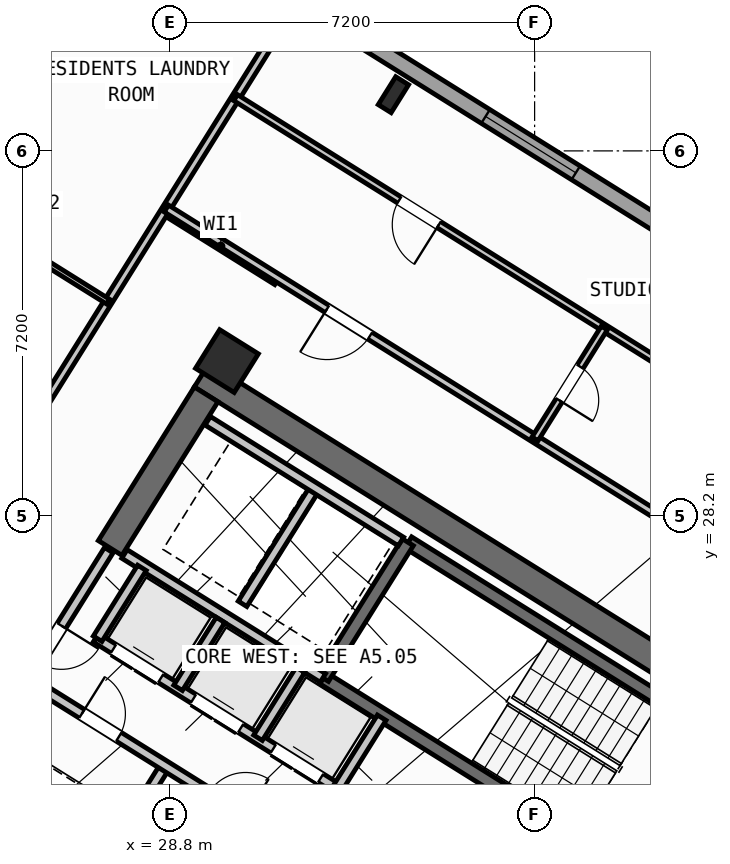
"""IFC4 building model, lengths in metres.
Left out: names, types, materials, properties, quantities, classifications, styles, units other than length and angle.
Written with IfcOpenShell. Run it as: python <this file> out.ifc"""

import sys

from ifc_helpers import new_model, si_unit, direction, frame, frame_2d, origin, origin_2d, place, context, subcontext, project, spatial, rectangle, hollow_rectangle, i_section, extrude, source, transform, mapped, element, fill, save


model = new_model("IFC4")
c1 = context("Model", 3, precision=1e-05, world=origin(), true_north=direction((0.0, 1.0)))
c2 = subcontext(c1, "Body", "Model", "MODEL_VIEW")
j1 = project(units=[si_unit("LENGTHUNIT", "METRE"), si_unit("PLANEANGLEUNIT", "RADIAN")], contexts=[c1])
p1 = place(None, origin())
s1 = spatial("IfcSite", under=j1, at=p1, CompositionType="ELEMENT")
p2 = place(p1, origin())
s2 = spatial("IfcBuilding", under=s1, at=p2, CompositionType="ELEMENT")
p3 = place(p2, frame((0.0, 0.0, 105.3)))
s3 = spatial("IfcBuildingStorey", under=s2, at=p3, CompositionType="ELEMENT", Elevation=105.3)
p4 = place(p3, frame((40.573, 24.01, 0.0), z_axis=(0.0, 0.0, 1.0), x_axis=(-0.848047359947, 0.529920442413, 0.0)))
e1 = element("IfcWall", 1, at=p4, inside=s3, PredefinedType="SHEAR", context=c2, shape_type="SweptSolid", body=[
    extrude(rectangle(XDim=13.14, YDim=0.55, at=frame_2d((6.57, 0.0))), origin(), (0.0, 0.0, 1.0), 3.35),
])
p5 = place(p3, frame((40.194, 23.922, 0.0), z_axis=(0.0, 0.0, 1.0), x_axis=(-0.529888438328, -0.848067357541, 0.0)))
e2 = element("IfcWall", 2, at=p5, inside=s3, PredefinedType="SHEAR", context=c2, shape_type="SweptSolid", body=[
    extrude(rectangle(XDim=3.575, YDim=0.55, at=frame_2d((1.788, 0.0))), origin(), (0.0, 0.0, 1.0), 3.35),
])
p6 = place(p3, frame((29.517, 30.594, 0.0), z_axis=(0.0, 0.0, 1.0), x_axis=(-0.529906864564, -0.848055844204, 0.0)))
e3 = element("IfcWall", 3, at=p6, inside=s3, PredefinedType="SHEAR", context=c2, shape_type="SweptSolid", body=[
    extrude(rectangle(XDim=3.575, YDim=0.55, at=frame_2d((1.788, 0.0))), origin(), (0.0, 0.0, 1.0), 3.35),
])
m1 = source(origin(), c2, "Body", "SweptSolid", [
    extrude(i_section(OverallWidth=0.3, OverallDepth=0.65, WebThickness=0.016, FlangeThickness=0.031, at=origin_2d()), origin(), (0.0, 0.0, 1.0), 3.6),
])
p7 = place(p3, frame((33.213, 36.509, 0.0), z_axis=(0.0, 0.0, 1.0), x_axis=(-0.848048096156, 0.529919264233, 0.0)))
e4 = element("IfcColumn", 4, at=p7, inside=s3, PredefinedType="COLUMN", context=c2, shape_type="MappedRepresentation", body=[
    mapped(m1, transform((0.0, 0.0, 0.0), scale=1.0)),
])
m2 = source(origin(), c2, "Body", "SweptSolid", [
    extrude(hollow_rectangle(XDim=0.9, YDim=0.9, WallThickness=0.036, at=origin_2d()), origin(), (0.0, 0.0, 1.0), 3.6),
])
p8 = place(p3, frame((29.928, 31.251, 0.0), z_axis=(0.0, 0.0, 1.0), x_axis=(-0.848048096156, 0.529919264233, 0.0)))
e5 = element("IfcColumn", 5, at=p8, inside=s3, PredefinedType="COLUMN", context=c2, shape_type="MappedRepresentation", body=[
    mapped(m2, transform((0.0, 0.0, 0.0), scale=1.0)),
])
p9 = place(p3, frame((31.76, 12.183, 0.0), z_axis=(0.0, 0.0, 1.0), x_axis=(-0.848047074256, 0.529920899612, 0.0)))
e6 = element("IfcWall", 6, at=p9, inside=s3, PredefinedType="STANDARD", context=c2, shape_type="SweptSolid", body=[
    extrude(rectangle(XDim=30.652, YDim=0.32, at=frame_2d((15.326, 0.0))), origin(), (0.0, 0.0, 1.0), 3.35),
])
p10 = place(p9, frame((15.153, 0.0, 0.0)))
e7 = element("IfcOpeningElement", 7, at=p10, cuts=e6, PredefinedType="OPENING", context=c2, shape_type="SweptSolid", body=[
    extrude(rectangle(XDim=1.2, YDim=2.15, at=frame_2d((0.6, 1.075))), frame((0.0, 0.17, 0.0), z_axis=(0.0, -1.0, 0.0), x_axis=(1.0, 0.0, 0.0)), (0.0, 0.0, 1.0), 0.34),
])
p11 = place(p9, frame((2.002, 0.0, 0.8)))
e8 = element("IfcOpeningElement", 8, at=p11, cuts=e6, PredefinedType="OPENING", context=c2, shape_type="SweptSolid", body=[
    extrude(rectangle(XDim=2.1, YDim=1.55, at=frame_2d((1.05, 0.775))), frame((0.0, 0.17, 0.0), z_axis=(0.0, -1.0, 0.0), x_axis=(1.0, 0.0, 0.0)), (0.0, 0.0, 1.0), 0.34),
])
p12 = place(p9, frame((7.206, 0.0, 0.8)))
e9 = element("IfcOpeningElement", 9, at=p12, cuts=e6, PredefinedType="OPENING", context=c2, shape_type="SweptSolid", body=[
    extrude(rectangle(XDim=2.1, YDim=1.55, at=frame_2d((1.05, 0.775))), frame((0.0, 0.17, 0.0), z_axis=(0.0, -1.0, 0.0), x_axis=(1.0, 0.0, 0.0)), (0.0, 0.0, 1.0), 0.34),
])
p13 = place(p9, frame((12.648, 0.0, 1.0)))
e10 = element("IfcOpeningElement", 10, at=p13, cuts=e6, PredefinedType="OPENING", context=c2, shape_type="SweptSolid", body=[
    extrude(rectangle(XDim=0.9, YDim=1.25, at=frame_2d((0.45, 0.625))), frame((0.0, 0.17, 0.0), z_axis=(0.0, -1.0, 0.0), x_axis=(1.0, 0.0, 0.0)), (0.0, 0.0, 1.0), 0.34),
])
p14 = place(p9, frame((20.628, 0.0, 0.95)))
e11 = element("IfcOpeningElement", 11, at=p14, cuts=e6, PredefinedType="OPENING", context=c2, shape_type="SweptSolid", body=[
    extrude(rectangle(XDim=1.2, YDim=1.4, at=frame_2d((0.6, 0.7))), frame((0.0, 0.17, 0.0), z_axis=(0.0, -1.0, 0.0), x_axis=(1.0, 0.0, 0.0)), (0.0, 0.0, 1.0), 0.34),
])
p15 = place(p9, frame((26.008, 0.0, 1.0)))
e12 = element("IfcOpeningElement", 12, at=p15, cuts=e6, PredefinedType="OPENING", context=c2, shape_type="SweptSolid", body=[
    extrude(rectangle(XDim=0.9, YDim=1.25, at=frame_2d((0.45, 0.625))), frame((0.0, 0.17, 0.0), z_axis=(0.0, -1.0, 0.0), x_axis=(1.0, 0.0, 0.0)), (0.0, 0.0, 1.0), 0.34),
])
p16 = place(p9, frame((28.408, 0.0, 1.0)))
e13 = element("IfcOpeningElement", 13, at=p16, cuts=e6, PredefinedType="OPENING", context=c2, shape_type="SweptSolid", body=[
    extrude(rectangle(XDim=0.9, YDim=1.25, at=frame_2d((0.45, 0.625))), frame((0.0, 0.17, 0.0), z_axis=(0.0, -1.0, 0.0), x_axis=(1.0, 0.0, 0.0)), (0.0, 0.0, 1.0), 0.34),
])
p17 = place(p3, frame((17.424, 47.083, 0.0), z_axis=(0.0, 0.0, 1.0), x_axis=(0.848049927979, -0.529916332693, 0.0)))
e14 = element("IfcWall", 14, at=p17, inside=s3, PredefinedType="STANDARD", context=c2, shape_type="SweptSolid", body=[
    extrude(rectangle(XDim=29.223, YDim=0.32, at=frame_2d((14.612, 0.0))), origin(), (0.0, 0.0, 1.0), 3.35),
])
p18 = place(p17, frame((3.709, 0.0, 0.0)))
e15 = element("IfcOpeningElement", 15, at=p18, cuts=e14, PredefinedType="OPENING", context=c2, shape_type="SweptSolid", body=[
    extrude(rectangle(XDim=1.05, YDim=2.15, at=frame_2d((0.525, 1.075))), frame((0.0, 0.17, 0.0), z_axis=(0.0, -1.0, 0.0), x_axis=(1.0, 0.0, 0.0)), (0.0, 0.0, 1.0), 0.34),
])
p19 = place(p17, frame((0.659, 0.0, 0.95)))
e16 = element("IfcOpeningElement", 16, at=p19, cuts=e14, PredefinedType="OPENING", context=c2, shape_type="SweptSolid", body=[
    extrude(rectangle(XDim=1.2, YDim=1.4, at=frame_2d((0.6, 0.7))), frame((0.0, 0.17, 0.0), z_axis=(0.0, -1.0, 0.0), x_axis=(1.0, 0.0, 0.0)), (0.0, 0.0, 1.0), 0.34),
])
p20 = place(p17, frame((6.972, 0.0, 1.0)))
e17 = element("IfcOpeningElement", 17, at=p20, cuts=e14, PredefinedType="OPENING", context=c2, shape_type="SweptSolid", body=[
    extrude(rectangle(XDim=0.9, YDim=1.25, at=frame_2d((0.45, 0.625))), frame((0.0, 0.17, 0.0), z_axis=(0.0, -1.0, 0.0), x_axis=(1.0, 0.0, 0.0)), (0.0, 0.0, 1.0), 0.34),
])
p21 = place(p17, frame((9.847, 0.0, 0.85)))
e18 = element("IfcOpeningElement", 18, at=p21, cuts=e14, PredefinedType="OPENING", context=c2, shape_type="SweptSolid", body=[
    extrude(rectangle(XDim=1.5, YDim=1.5, at=frame_2d((0.75, 0.75))), frame((0.0, 0.17, 0.0), z_axis=(0.0, -1.0, 0.0), x_axis=(1.0, 0.0, 0.0)), (0.0, 0.0, 1.0), 0.34),
])
p22 = place(p17, frame((13.889, 0.0, 0.95)))
e19 = element("IfcOpeningElement", 19, at=p22, cuts=e14, PredefinedType="OPENING", context=c2, shape_type="SweptSolid", body=[
    extrude(rectangle(XDim=1.2, YDim=1.4, at=frame_2d((0.6, 0.7))), frame((0.0, 0.17, 0.0), z_axis=(0.0, -1.0, 0.0), x_axis=(1.0, 0.0, 0.0)), (0.0, 0.0, 1.0), 0.34),
])
p23 = place(p17, frame((17.254, 0.0, 1.0)))
e20 = element("IfcOpeningElement", 20, at=p23, cuts=e14, PredefinedType="OPENING", context=c2, shape_type="SweptSolid", body=[
    extrude(rectangle(XDim=0.9, YDim=1.25, at=frame_2d((0.45, 0.625))), frame((0.0, 0.17, 0.0), z_axis=(0.0, -1.0, 0.0), x_axis=(1.0, 0.0, 0.0)), (0.0, 0.0, 1.0), 0.34),
])
p24 = place(p17, frame((20.764, 0.0, 0.8)))
e21 = element("IfcOpeningElement", 21, at=p24, cuts=e14, PredefinedType="OPENING", context=c2, shape_type="SweptSolid", body=[
    extrude(rectangle(XDim=2.1, YDim=1.55, at=frame_2d((1.05, 0.775))), frame((0.0, 0.17, 0.0), z_axis=(0.0, -1.0, 0.0), x_axis=(1.0, 0.0, 0.0)), (0.0, 0.0, 1.0), 0.34),
])
p25 = place(p17, frame((25.403, 0.0, 0.8)))
e22 = element("IfcOpeningElement", 22, at=p25, cuts=e14, PredefinedType="OPENING", context=c2, shape_type="SweptSolid", body=[
    extrude(rectangle(XDim=2.1, YDim=1.55, at=frame_2d((1.05, 0.775))), frame((0.0, 0.17, 0.0), z_axis=(0.0, -1.0, 0.0), x_axis=(1.0, 0.0, 0.0)), (0.0, 0.0, 1.0), 0.34),
])
p26 = place(p3, frame((39.721, 23.788, 0.0), z_axis=(0.0, 0.0, 1.0), x_axis=(-0.848054434086, 0.529909121291, 0.0)))
e23 = element("IfcWall", 23, at=p26, inside=s3, PredefinedType="SHEAR", context=c2, shape_type="SweptSolid", body=[
    extrude(rectangle(XDim=7.33, YDim=0.26, at=frame_2d((3.665, 0.0))), origin(), (0.0, 0.0, 1.0), 3.35),
])
p27 = place(p3, frame((38.046, 21.108, 0.0), z_axis=(0.0, 0.0, 1.0), x_axis=(-0.848054434086, 0.529909121291, 0.0)))
e24 = element("IfcWall", 24, at=p27, inside=s3, PredefinedType="SHEAR", context=c2, shape_type="SweptSolid", body=[
    extrude(rectangle(XDim=7.33, YDim=0.26, at=frame_2d((3.665, 0.0))), origin(), (0.0, 0.0, 1.0), 3.35),
])
p28 = place(p27, frame((0.22, 0.0, 0.0)))
e25 = element("IfcOpeningElement", 25, at=p28, cuts=e24, PredefinedType="OPENING", context=c2, shape_type="SweptSolid", body=[
    extrude(rectangle(XDim=1.1, YDim=2.1, at=frame_2d((0.55, 1.05))), frame((0.0, 0.14, 0.0), z_axis=(0.0, -1.0, 0.0), x_axis=(1.0, 0.0, 0.0)), (0.0, 0.0, 1.0), 0.28),
])
p29 = place(p3, frame((33.496, 27.677, 0.0), z_axis=(0.0, 0.0, 1.0), x_axis=(-0.529908658664, -0.84805472316, 0.0)))
e26 = element("IfcWall", 26, at=p29, inside=s3, PredefinedType="SHEAR", context=c2, shape_type="SweptSolid", body=[
    extrude(rectangle(XDim=3.16, YDim=0.26, at=frame_2d((1.58, 0.0))), origin(), (0.0, 0.0, 1.0), 3.35),
])
p30 = place(p3, frame((31.822, 24.998, 0.0), z_axis=(0.0, 0.0, 1.0), x_axis=(-0.848036912365, 0.52993716162, 0.0)))
e27 = element("IfcWall", 27, at=p30, inside=s3, PredefinedType="STANDARD", context=c2, shape_type="SweptSolid", body=[
    extrude(rectangle(XDim=4.618, YDim=0.2, at=frame_2d((2.309, 0.0))), origin(), (0.0, 0.0, 1.0), 3.34),
])
p31 = place(p3, frame((32.108, 22.814, 0.0), z_axis=(0.0, 0.0, 1.0), x_axis=(-0.848042229521, 0.529928652696, 0.0)))
e28 = element("IfcWall", 28, at=p31, inside=s3, PredefinedType="STANDARD", context=c2, shape_type="SweptSolid", body=[
    extrude(rectangle(XDim=5.62, YDim=0.2, at=frame_2d((2.81, 0.0))), origin(), (0.0, 0.0, 1.0), 3.34),
])
p32 = place(p31, frame((0.39, 0.0, 0.0)))
e29 = element("IfcOpeningElement", 29, at=p32, cuts=e28, PredefinedType="OPENING", context=c2, shape_type="SweptSolid", body=[
    extrude(rectangle(XDim=1.1, YDim=2.15, at=frame_2d((0.55, 1.075))), frame((0.0, 0.11, 0.0), z_axis=(0.0, -1.0, 0.0), x_axis=(1.0, 0.0, 0.0)), (0.0, 0.0, 1.0), 0.22),
])
p33 = place(p31, frame((2.25, 0.0, 0.0)))
e30 = element("IfcOpeningElement", 30, at=p33, cuts=e28, PredefinedType="OPENING", context=c2, shape_type="SweptSolid", body=[
    extrude(rectangle(XDim=1.1, YDim=2.15, at=frame_2d((0.55, 1.075))), frame((0.0, 0.11, 0.0), z_axis=(0.0, -1.0, 0.0), x_axis=(1.0, 0.0, 0.0)), (0.0, 0.0, 1.0), 0.22),
])
p34 = place(p31, frame((4.11, 0.0, 0.0)))
e31 = element("IfcOpeningElement", 31, at=p34, cuts=e28, PredefinedType="OPENING", context=c2, shape_type="SweptSolid", body=[
    extrude(rectangle(XDim=1.1, YDim=2.15, at=frame_2d((0.55, 1.075))), frame((0.0, 0.11, 0.0), z_axis=(0.0, -1.0, 0.0), x_axis=(1.0, 0.0, 0.0)), (0.0, 0.0, 1.0), 0.22),
])
p35 = place(p3, frame((32.982, 24.213, 0.0), z_axis=(0.0, 0.0, 1.0), x_axis=(-0.529839334948, -0.84809803628, 0.0)))
e32 = element("IfcWall", 32, at=p35, inside=s3, PredefinedType="STANDARD", context=c2, shape_type="SweptSolid", body=[
    extrude(rectangle(XDim=1.65, YDim=0.2, at=frame_2d((0.825, 0.0))), origin(), (0.0, 0.0, 1.0), 3.34),
])
p36 = place(p3, frame((28.25, 27.17, 0.0), z_axis=(0.0, 0.0, 1.0), x_axis=(-0.529905827651, -0.848056492117, 0.0)))
e33 = element("IfcWall", 33, at=p36, inside=s3, PredefinedType="STANDARD", context=c2, shape_type="SweptSolid", body=[
    extrude(rectangle(XDim=1.65, YDim=0.2, at=frame_2d((0.825, 0.0))), origin(), (0.0, 0.0, 1.0), 3.34),
])
p37 = place(p3, frame((31.645, 28.716, 0.0), z_axis=(0.0, 0.0, 1.0), x_axis=(-0.52986693015, -0.848080795876, 0.0)))
e34 = element("IfcWall", 34, at=p37, inside=s3, PredefinedType="STANDARD", context=c2, shape_type="SweptSolid", body=[
    extrude(rectangle(XDim=2.66, YDim=0.2, at=frame_2d((1.33, 0.0))), origin(), (0.0, 0.0, 1.0), 3.34),
])
p38 = place(p3, frame((33.363, 27.69, 0.0), z_axis=(0.0, 0.0, 1.0), x_axis=(-0.848047090064, 0.529920874315, 0.0)))
e35 = element("IfcWall", 35, at=p38, inside=s3, PredefinedType="STANDARD", context=c2, shape_type="SweptSolid", body=[
    extrude(rectangle(XDim=4.498, YDim=0.2, at=frame_2d((2.249, 0.0))), origin(), (0.0, 0.0, 1.0), 3.34),
])
for number, where, z_axis, x_axis in (
    (36, (31.379, 25.156, 0.0), (0.0, 0.0, 1.0), (-0.53, -0.848, 0.0)),
    (37, (29.801, 26.142, 0.0), (0.0, 0.0, 1.0), (-0.53, -0.848, 0.0)),
):
    element("IfcWall", number, at=place(p3, frame(where, z_axis=z_axis, x_axis=x_axis)), inside=s3, PredefinedType="STANDARD", context=c2, shape_type="SweptSolid", body=[
        extrude(rectangle(XDim=1.58, YDim=0.2, at=frame_2d((0.79, 0.0))), origin(), (0.0, 0.0, 1.0), 3.34),
    ])
p39 = place(p3, frame((28.71, 23.263, 0.0), z_axis=(0.0, 0.0, 1.0), x_axis=(-0.529907497854, -0.848055448493, 0.0)))
e38 = element("IfcWall", 38, at=p39, inside=s3, PredefinedType="STANDARD", context=c2, shape_type="SweptSolid", body=[
    extrude(rectangle(XDim=2.88, YDim=0.2, at=frame_2d((1.44, 0.0))), origin(), (0.0, 0.0, 1.0), 3.34),
])
p40 = place(p3, frame((31.525, 21.504, 0.0), z_axis=(0.0, 0.0, 1.0), x_axis=(-0.848040211232, 0.529931882541, 0.0)))
e39 = element("IfcWall", 39, at=p40, inside=s3, PredefinedType="STANDARD", context=c2, shape_type="SweptSolid", body=[
    extrude(rectangle(XDim=6.218, YDim=0.2, at=frame_2d((3.109, 0.0))), origin(), (0.0, 0.0, 1.0), 3.34),
])
p41 = place(p40, frame((4.4, 0.0, 0.0)))
e40 = element("IfcOpeningElement", 40, at=p41, cuts=e39, PredefinedType="OPENING", context=c2, shape_type="SweptSolid", body=[
    extrude(rectangle(XDim=0.86, YDim=2.05, at=frame_2d((0.43, 1.025))), frame((0.0, 0.11, 0.0), z_axis=(0.0, -1.0, 0.0), x_axis=(1.0, 0.0, 0.0)), (0.0, 0.0, 1.0), 0.22),
])
p42 = place(p40, frame((1.45, 0.0, 0.0)))
e41 = element("IfcOpeningElement", 41, at=p42, cuts=e39, PredefinedType="OPENING", context=c2, shape_type="SweptSolid", body=[
    extrude(rectangle(XDim=0.86, YDim=2.05, at=frame_2d((0.43, 1.025))), frame((0.0, 0.11, 0.0), z_axis=(0.0, -1.0, 0.0), x_axis=(1.0, 0.0, 0.0)), (0.0, 0.0, 1.0), 0.22),
])
p43 = place(p3, frame((27.596, 27.52, 0.0), z_axis=(0.0, 0.0, 1.0), x_axis=(-0.529865479138, -0.848081702443, 0.0)))
e42 = element("IfcWall", 42, at=p43, inside=s3, PredefinedType="STANDARD", context=c2, shape_type="SweptSolid", body=[
    extrude(rectangle(XDim=2.96, YDim=0.2, at=frame_2d((1.48, 0.0))), origin(), (0.0, 0.0, 1.0), 3.34),
])
p44 = place(p43, frame((1.76, 0.0, 0.0)))
e43 = element("IfcOpeningElement", 43, at=p44, cuts=e42, PredefinedType="OPENING", context=c2, shape_type="SweptSolid", body=[
    extrude(rectangle(XDim=0.86, YDim=2.05, at=frame_2d((0.43, 1.025))), frame((0.0, 0.11, 0.0), z_axis=(0.0, -1.0, 0.0), x_axis=(1.0, 0.0, 0.0)), (0.0, 0.0, 1.0), 0.22),
])
p45 = place(p3, frame((30.914, 32.829, 0.0), z_axis=(0.0, 0.0, 1.0), x_axis=(-0.848008813643, 0.529982124211, 0.0)))
e44 = element("IfcWall", 44, at=p45, inside=s3, PredefinedType="PARTITIONING", context=c2, shape_type="SweptSolid", body=[
    extrude(rectangle(XDim=2.61, YDim=0.16, at=frame_2d((1.305, 0.0))), origin(), (0.0, 0.0, 1.0), 3.34),
])
p46 = place(p3, frame((31.239, 38.274, 0.0), z_axis=(0.0, 0.0, 1.0), x_axis=(-0.529918119251, -0.84804881162, 0.0)))
e45 = element("IfcWall", 45, at=p46, inside=s3, PredefinedType="PARTITIONING", context=c2, shape_type="SweptSolid", body=[
    extrude(rectangle(XDim=17.65, YDim=0.16, at=frame_2d((8.825, 0.0))), origin(), (0.0, 0.0, 1.0), 3.34),
])
p47 = place(p3, frame((27.607, 39.615, 0.0), z_axis=(0.0, 0.0, 1.0), x_axis=(-0.529913610495, -0.848051628978, 0.0)))
e46 = element("IfcWall", 46, at=p47, inside=s3, PredefinedType="PARTITIONING", context=c2, shape_type="SweptSolid", body=[
    extrude(rectangle(XDim=5.401, YDim=0.16, at=frame_2d((2.7, 0.0))), origin(), (0.0, 0.0, 1.0), 2.775),
])
p48 = place(p3, frame((27.583, 32.424, 0.0), z_axis=(0.0, 0.0, 1.0), x_axis=(-0.848031272749, 0.529946186362, 0.0)))
e47 = element("IfcWall", 47, at=p48, inside=s3, PredefinedType="PARTITIONING", context=c2, shape_type="SweptSolid", body=[
    extrude(rectangle(XDim=3.328, YDim=0.11, at=frame_2d((1.664, 0.0))), origin(), (0.0, 0.0, 1.0), 2.775),
])
p49 = place(p48, frame((1.435, 0.0, 0.0)))
e48 = element("IfcOpeningElement", 48, at=p49, cuts=e47, PredefinedType="OPENING", context=c2, shape_type="SweptSolid", body=[
    extrude(rectangle(XDim=0.92, YDim=2.08, at=frame_2d((0.46, 1.04))), frame((0.0, 0.065, 0.0), z_axis=(0.0, -1.0, 0.0), x_axis=(1.0, 0.0, 0.0)), (0.0, 0.0, 1.0), 0.13),
])
p50 = place(p3, frame((41.936, 26.012, 0.0), z_axis=(0.0, 0.0, 1.0), x_axis=(-0.848051154596, 0.529914369676, 0.0)))
e49 = element("IfcWall", 49, at=p50, inside=s3, PredefinedType="PARTITIONING", context=c2, shape_type="SweptSolid", body=[
    extrude(rectangle(XDim=15.57, YDim=0.16, at=frame_2d((7.785, 0.0))), origin(), (0.0, 0.0, 1.0), 3.34),
])
p51 = place(p50, frame((10.83, 0.0, 0.0)))
e50 = element("IfcOpeningElement", 50, at=p51, cuts=e49, PredefinedType="OPENING", context=c2, shape_type="SweptSolid", body=[
    extrude(rectangle(XDim=1.0, YDim=2.1, at=frame_2d((0.5, 1.05))), frame((0.0, 0.09, 0.0), z_axis=(0.0, -1.0, 0.0), x_axis=(1.0, 0.0, 0.0)), (0.0, 0.0, 1.0), 0.18),
])
p52 = place(p3, frame((42.226, 28.873, 0.0), z_axis=(0.0, 0.0, 1.0), x_axis=(-0.848049134363, 0.529917602752, 0.0)))
e51 = element("IfcWall", 51, at=p52, inside=s3, PredefinedType="PLUMBINGWALL", context=c2, shape_type="SweptSolid", body=[
    extrude(rectangle(XDim=14.3, YDim=0.14, at=frame_2d((7.15, 0.0))), origin(), (0.0, 0.0, 1.0), 3.34),
])
p53 = place(p52, frame((9.57, 0.0, 0.0)))
e52 = element("IfcOpeningElement", 52, at=p53, cuts=e51, PredefinedType="OPENING", context=c2, shape_type="SweptSolid", body=[
    extrude(rectangle(XDim=0.92, YDim=2.08, at=frame_2d((0.46, 1.04))), frame((0.0, 0.08, 0.0), z_axis=(0.0, -1.0, 0.0), x_axis=(1.0, 0.0, 0.0)), (0.0, 0.0, 1.0), 0.16),
])
p54 = place(p3, frame((37.375, 31.904, 0.0), z_axis=(0.0, 0.0, 1.0), x_axis=(-0.529913878929, -0.848051461244, 0.0)))
e53 = element("IfcWall", 53, at=p54, inside=s3, PredefinedType="PLUMBINGWALL", context=c2, shape_type="SweptSolid", body=[
    extrude(rectangle(XDim=2.58, YDim=0.14, at=frame_2d((1.29, 0.0))), origin(), (0.0, 0.0, 1.0), 3.34),
])
p55 = place(p54, frame((0.9, 0.0, 0.0)))
e54 = element("IfcOpeningElement", 54, at=p55, cuts=e53, PredefinedType="OPENING", context=c2, shape_type="SweptSolid", body=[
    extrude(rectangle(XDim=0.78, YDim=2.05, at=frame_2d((0.39, 1.025))), frame((0.0, 0.08, 0.0), z_axis=(0.0, -1.0, 0.0), x_axis=(1.0, 0.0, 0.0)), (0.0, 0.0, 1.0), 0.16),
])
m3 = source(origin(), c2, "Body", "SweptSolid", [
    extrude(rectangle(XDim=2.1, YDim=1.55, at=frame_2d((1.05, 0.775))), frame((0.0, 0.03, 0.0), z_axis=(0.0, -1.0, 0.0), x_axis=(1.0, 0.0, 0.0)), (0.0, 0.0, 1.0), 0.06),
])
p56 = place(p24, origin())
e55 = element("IfcWindow", 55, at=p56, inside=s3, PartitioningType="SINGLE_PANEL", PredefinedType="WINDOW", context=c2, shape_type="MappedRepresentation", body=[
    mapped(m3, transform((0.0, 0.0, 0.0), scale=1.0)),
])
fill(e21, e55)
m4 = source(origin(), c2, "Body", "SweptSolid", [
    extrude(rectangle(XDim=1.1, YDim=2.15, at=frame_2d((0.55, 1.075))), frame((0.0, 0.025, 0.0), z_axis=(0.0, -1.0, 0.0), x_axis=(1.0, 0.0, 0.0)), (0.0, 0.0, 1.0), 0.05),
])
p57 = place(p32, origin())
e56 = element("IfcDoor", 56, at=p57, inside=s3, OperationType="DOUBLE_DOOR_SLIDING", PredefinedType="DOOR", context=c2, shape_type="MappedRepresentation", body=[
    mapped(m4, transform((0.0, 0.0, 0.0), scale=1.0)),
])
fill(e29, e56)
p58 = place(p33, origin())
e57 = element("IfcDoor", 57, at=p58, inside=s3, OperationType="DOUBLE_DOOR_SLIDING", PredefinedType="DOOR", context=c2, shape_type="MappedRepresentation", body=[
    mapped(m4, transform((0.0, 0.0, 0.0), scale=1.0)),
])
fill(e30, e57)
p59 = place(p34, origin())
e58 = element("IfcDoor", 58, at=p59, inside=s3, OperationType="DOUBLE_DOOR_SLIDING", PredefinedType="DOOR", context=c2, shape_type="MappedRepresentation", body=[
    mapped(m4, transform((0.0, 0.0, 0.0), scale=1.0)),
])
fill(e31, e58)
m5 = source(origin(), c2, "Body", "SweptSolid", [
    extrude(rectangle(XDim=0.86, YDim=2.05, at=frame_2d((0.43, 1.025))), frame((0.0, 0.025, 0.0), z_axis=(0.0, -1.0, 0.0), x_axis=(1.0, 0.0, 0.0)), (0.0, 0.0, 1.0), 0.05),
])
p60 = place(p41, frame((0.86, 0.0, 0.0), z_axis=(0.0, 0.0, 1.0), x_axis=(-1.0, 0.0, 0.0)))
e59 = element("IfcDoor", 59, at=p60, inside=s3, OperationType="SINGLE_SWING_LEFT", PredefinedType="DOOR", context=c2, shape_type="MappedRepresentation", body=[
    mapped(m5, transform((0.0, 0.0, 0.0), scale=1.0)),
])
fill(e40, e59)
p61 = place(p44, origin())
e60 = element("IfcDoor", 60, at=p61, inside=s3, OperationType="SINGLE_SWING_LEFT", PredefinedType="DOOR", context=c2, shape_type="MappedRepresentation", body=[
    mapped(m5, transform((0.0, 0.0, 0.0), scale=1.0)),
])
fill(e43, e60)
m6 = source(origin(), c2, "Body", "SweptSolid", [
    extrude(rectangle(XDim=1.0, YDim=2.1, at=frame_2d((0.5, 1.05))), frame((0.0, 0.025, 0.0), z_axis=(0.0, -1.0, 0.0), x_axis=(1.0, 0.0, 0.0)), (0.0, 0.0, 1.0), 0.05),
])
p62 = place(p51, origin())
e61 = element("IfcDoor", 61, at=p62, inside=s3, OperationType="SINGLE_SWING_RIGHT", PredefinedType="DOOR", context=c2, shape_type="MappedRepresentation", body=[
    mapped(m6, transform((0.0, 0.0, 0.0), scale=1.0)),
])
fill(e50, e61)
m7 = source(origin(), c2, "Body", "SweptSolid", [
    extrude(rectangle(XDim=0.92, YDim=2.08, at=frame_2d((0.46, 1.04))), frame((0.0, 0.025, 0.0), z_axis=(0.0, -1.0, 0.0), x_axis=(1.0, 0.0, 0.0)), (0.0, 0.0, 1.0), 0.05),
])
p63 = place(p53, origin())
e62 = element("IfcDoor", 62, at=p63, inside=s3, OperationType="SINGLE_SWING_LEFT", PredefinedType="DOOR", context=c2, shape_type="MappedRepresentation", body=[
    mapped(m7, transform((0.0, 0.0, 0.0), scale=1.0)),
])
fill(e52, e62)
m8 = source(origin(), c2, "Body", "SweptSolid", [
    extrude(rectangle(XDim=0.78, YDim=2.05, at=frame_2d((0.39, 1.025))), frame((0.0, 0.025, 0.0), z_axis=(0.0, -1.0, 0.0), x_axis=(1.0, 0.0, 0.0)), (0.0, 0.0, 1.0), 0.05),
])
p64 = place(p55, origin())
e63 = element("IfcDoor", 63, at=p64, inside=s3, OperationType="SINGLE_SWING_RIGHT", PredefinedType="DOOR", context=c2, shape_type="MappedRepresentation", body=[
    mapped(m8, transform((0.0, 0.0, 0.0), scale=1.0)),
])
fill(e54, e63)
save(model, sys.argv[1])
